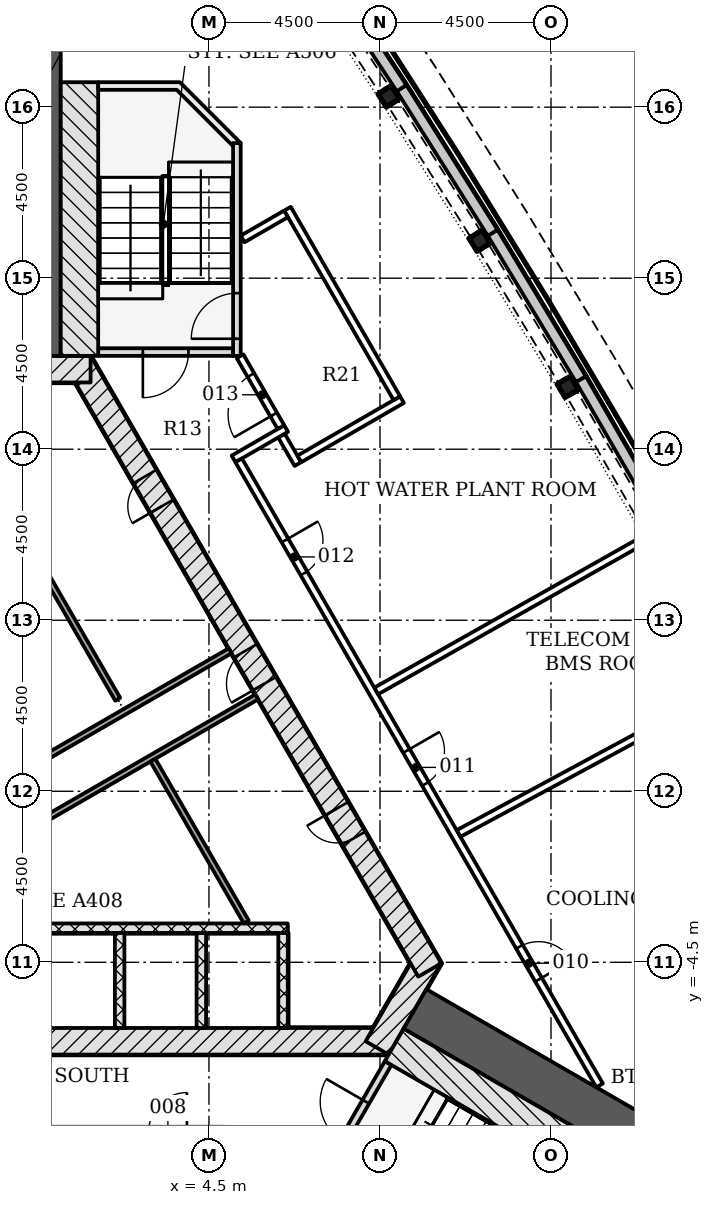
"""IFC4 building model, lengths in metres.
Left out: names, types, materials, properties, quantities, classifications, styles, units other than length and angle.
Written with IfcOpenShell. Run it as: python <this file> out.ifc"""

import sys

from ifc_helpers import new_model, si_unit, direction, frame, frame_2d, origin, origin_2d, place, context, subcontext, project, spatial, polyline, rectangle, i_section, outline, extrude, element, fill, save


model = new_model("IFC4")
c1 = context("Model", 3, precision=1e-05, world=origin(), true_north=direction((0.0, 1.0)))
c2 = subcontext(c1, "Body", "Model", "MODEL_VIEW")
j1 = project(units=[si_unit("LENGTHUNIT", "METRE"), si_unit("PLANEANGLEUNIT", "RADIAN")], contexts=[c1])
p1 = place(None, origin())
s1 = spatial("IfcSite", under=j1, at=p1, CompositionType="ELEMENT")
p2 = place(p1, origin())
s2 = spatial("IfcBuilding", under=s1, at=p2, CompositionType="ELEMENT")
p3 = place(p2, frame((0.0, 0.0, 52.8)))
s3 = spatial("IfcBuildingStorey", under=s2, at=p3, CompositionType="ELEMENT", Elevation=52.8)
p4 = place(p3, frame((-9.229, -6.578, -0.3), z_axis=(0.0, 0.0, 1.0), x_axis=(1.0, 0.0, 0.0)))
e1 = element("IfcWall", 1, at=p4, inside=s3, PredefinedType="SHEAR", context=c2, shape_type="SweptSolid", body=[
    extrude(rectangle(XDim=18.458, YDim=0.7, at=frame_2d((9.229, 0.0))), origin(), (0.0, 0.0, 1.0), 5.5),
])
p5 = place(p4, frame((1.079, 0.0, 0.3)))
e2 = element("IfcOpeningElement", 2, at=p5, cuts=e1, PredefinedType="OPENING", context=c2, shape_type="SweptSolid", body=[
    extrude(rectangle(XDim=0.9, YDim=2.1, at=frame_2d((0.45, 1.05))), frame((0.0, 0.36, 0.0), z_axis=(0.0, -1.0, 0.0), x_axis=(1.0, 0.0, 0.0)), (0.0, 0.0, 1.0), 0.72),
])
p6 = place(p3, frame((8.926, -6.753, -0.3), z_axis=(0.0, 0.0, 1.0), x_axis=(0.500042739161, 0.866000726912, 0.0)))
e3 = element("IfcWall", 3, at=p6, inside=s3, PredefinedType="SHEAR", context=c2, shape_type="SweptSolid", body=[
    extrude(rectangle(XDim=2.771, YDim=0.7, at=frame_2d((1.386, 0.0))), origin(), (0.0, 0.0, 1.0), 5.5),
])
p7 = place(p3, frame((10.311, -4.703, -0.3), z_axis=(0.0, 0.0, 1.0), x_axis=(-0.500001446645, 0.866024568562, 0.0)))
e4 = element("IfcWall", 4, at=p7, inside=s3, PredefinedType="SHEAR", context=c2, shape_type="SweptSolid", body=[
    extrude(rectangle(XDim=18.458, YDim=0.7, at=frame_2d((9.229, 0.0))), origin(), (0.0, 0.0, 1.0), 5.5),
])
p8 = place(p7, frame((8.7, 0.0, 0.3)))
e5 = element("IfcOpeningElement", 5, at=p8, cuts=e4, PredefinedType="OPENING", context=c2, shape_type="SweptSolid", body=[
    extrude(rectangle(XDim=1.0, YDim=2.1, at=frame_2d((0.5, 1.05))), frame((0.0, 0.36, 0.0), z_axis=(0.0, -1.0, 0.0), x_axis=(1.0, 0.0, 0.0)), (0.0, 0.0, 1.0), 0.72),
])
p9 = place(p7, frame((4.002, 0.0, 0.3)))
e6 = element("IfcOpeningElement", 6, at=p9, cuts=e4, PredefinedType="OPENING", context=c2, shape_type="SweptSolid", body=[
    extrude(rectangle(XDim=0.9, YDim=2.1, at=frame_2d((0.45, 1.05))), frame((0.0, 0.36, 0.0), z_axis=(0.0, -1.0, 0.0), x_axis=(1.0, 0.0, 0.0)), (0.0, 0.0, 1.0), 0.72),
])
p10 = place(p7, frame((14.093, 0.0, 0.3)))
e7 = element("IfcOpeningElement", 7, at=p10, cuts=e4, PredefinedType="OPENING", context=c2, shape_type="SweptSolid", body=[
    extrude(rectangle(XDim=0.9, YDim=2.1, at=frame_2d((0.45, 1.05))), frame((0.0, 0.36, 0.0), z_axis=(0.0, -1.0, 0.0), x_axis=(1.0, 0.0, 0.0)), (0.0, 0.0, 1.0), 0.72),
])
p11 = place(p3, frame((1.386, 11.106, -0.3), z_axis=(0.0, 0.0, 1.0), x_axis=(-1.0, 0.0, 0.0)))
e8 = element("IfcWall", 8, at=p11, inside=s3, PredefinedType="SHEAR", context=c2, shape_type="SweptSolid", body=[
    extrude(rectangle(XDim=2.771, YDim=0.7, at=frame_2d((1.386, 0.0))), origin(), (0.0, 0.0, 1.0), 5.5),
])
p12 = place(p3, frame((0.0, 11.456, -0.3), z_axis=(0.0, 0.0, 1.0), x_axis=(0.0, 1.0, 0.0)))
e9 = element("IfcWall", 9, at=p12, inside=s3, PredefinedType="SHEAR", context=c2, shape_type="SweptSolid", body=[
    extrude(rectangle(XDim=13.699, YDim=1.2, at=frame_2d((6.849, 0.0))), origin(), (0.0, 0.0, 1.0), 5.5),
])
p13 = place(p3, frame((9.922, -5.728, -0.3), z_axis=(0.0, 0.0, 1.0), x_axis=(0.866030067197, -0.499991922645, 0.0)))
e10 = element("IfcWall", 10, at=p13, inside=s3, PredefinedType="SHEAR", context=c2, shape_type="SweptSolid", body=[
    extrude(rectangle(XDim=13.698, YDim=1.2, at=frame_2d((6.849, 0.0))), origin(), (0.0, 0.0, 1.0), 5.5),
])
for number, where, z_axis, x_axis in (
    (11, (13.941, 10.641, -0.3), (0.0, 0.0, 1.0), (-0.508, 0.861, 0.0)),
    (12, (11.623, 14.485, -0.3), (0.0, 0.0, 1.0), (-0.525, 0.851, 0.0)),
    (13, (9.231, 18.285, -0.3), (0.0, 0.0, 1.0), (-0.541, 0.841, 0.0)),
):
    element("IfcColumn", number, at=place(p3, frame(where, z_axis=z_axis, x_axis=x_axis)), inside=s3, PredefinedType="COLUMN", context=c2, shape_type="SweptSolid", body=[
        extrude(i_section(OverallWidth=0.404, OverallDepth=0.406, WebThickness=0.027, FlangeThickness=0.044, FilletRadius=0.015, at=origin_2d()), origin(), (0.0, 0.0, 1.0), 5.5),
    ])
p14 = place(p3, origin())
e14 = element("IfcWall", 14, at=p14, inside=s3, PredefinedType="NOTDEFINED", context=c2, shape_type="SweptSolid", body=[
    extrude(outline(polyline([(16.665, 7.023), (14.415, 10.921), (14.155, 10.771), (16.405, 6.874), (16.665, 7.023)])), origin(), (0.0, 0.0, 1.0), 1.2),
])
p15 = place(p3, origin())
e15 = element("IfcWall", 15, at=p15, inside=s3, PredefinedType="NOTDEFINED", context=c2, shape_type="SweptSolid", body=[
    extrude(outline(polyline([(14.415, 10.921), (12.091, 14.774), (11.834, 14.619), (14.158, 10.766), (14.415, 10.921)])), origin(), (0.0, 0.0, 1.0), 1.2),
])
p16 = place(p3, origin())
e16 = element("IfcWall", 16, at=p16, inside=s3, PredefinedType="NOTDEFINED", context=c2, shape_type="SweptSolid", body=[
    extrude(outline(polyline([(12.091, 14.774), (9.694, 18.582), (9.44, 18.422), (11.837, 14.614), (12.091, 14.774)])), origin(), (0.0, 0.0, 1.0), 1.2),
])
p17 = place(p3, origin())
e17 = element("IfcWall", 17, at=p17, inside=s3, PredefinedType="NOTDEFINED", context=c2, shape_type="SweptSolid", body=[
    extrude(outline(polyline([(9.694, 18.582), (7.225, 22.344), (6.974, 22.179), (9.443, 18.418), (9.694, 18.582)])), origin(), (0.0, 0.0, 1.0), 1.2),
])
for number, where, z_axis, x_axis in (
    (18, (2.15, -6.228, -0.3), (0.0, 0.0, 1.0), (0.0, 1.0, 0.0)),
    (19, (4.3, -6.228, -0.3), (0.0, 0.0, 1.0), (0.0, 1.0, 0.0)),
    (20, (6.45, -6.228, -0.3), (0.0, 0.0, 1.0), (0.0, 1.0, 0.0)),
):
    element("IfcWall", number, at=place(p3, frame(where, z_axis=z_axis, x_axis=x_axis)), inside=s3, PredefinedType="PARTITIONING", context=c2, shape_type="SweptSolid", body=[
        extrude(rectangle(XDim=2.5, YDim=0.25, at=frame_2d((1.25, 0.0))), origin(), (0.0, 0.0, 1.0), 5.5),
    ])
p18 = place(p3, frame((-6.575, -3.603, 0.0), z_axis=(0.0, 0.0, 1.0), x_axis=(1.0, 0.0, 0.0)))
e21 = element("IfcWall", 21, at=p18, inside=s3, PredefinedType="PARTITIONING", context=c2, shape_type="SweptSolid", body=[
    extrude(rectangle(XDim=13.15, YDim=0.25, at=frame_2d((6.575, 0.0))), origin(), (0.0, 0.0, 1.0), 5.2),
])
p19 = place(p3, frame((-4.548, -1.851, 0.0), z_axis=(0.0, 0.0, 1.0), x_axis=(0.866023939251, 0.500002536638, 0.0)))
e22 = element("IfcWall", 22, at=p19, inside=s3, PredefinedType="PARTITIONING", context=c2, shape_type="SweptSolid", body=[
    extrude(rectangle(XDim=11.092, YDim=0.15, at=frame_2d((5.546, 0.0))), origin(), (0.0, 0.0, 1.0), 5.2),
])
p20 = place(p19, frame((3.497, 0.0, 0.0)))
e23 = element("IfcOpeningElement", 23, at=p20, cuts=e22, PredefinedType="OPENING", context=c2, shape_type="SweptSolid", body=[
    extrude(rectangle(XDim=0.9, YDim=2.1, at=frame_2d((0.45, 1.05))), frame((0.0, 0.085, 0.0), z_axis=(0.0, -1.0, 0.0), x_axis=(1.0, 0.0, 0.0)), (0.0, 0.0, 1.0), 0.17),
])
p21 = place(p3, frame((2.099, 2.42, 0.0), z_axis=(0.0, 0.0, 1.0), x_axis=(-0.499998449073, 0.866026299211, 0.0)))
e24 = element("IfcWall", 24, at=p21, inside=s3, PredefinedType="PARTITIONING", context=c2, shape_type="SweptSolid", body=[
    extrude(rectangle(XDim=4.211, YDim=0.15, at=frame_2d((2.106, 0.0))), origin(), (0.0, 0.0, 1.0), 5.2),
])
p22 = place(p3, frame((-4.454, -3.413, 0.0), z_axis=(0.0, 0.0, 1.0), x_axis=(0.86603043987, 0.499991277142, 0.0)))
e25 = element("IfcWall", 25, at=p22, inside=s3, PredefinedType="PARTITIONING", context=c2, shape_type="SweptSolid", body=[
    extrude(rectangle(XDim=11.792, YDim=0.15, at=frame_2d((5.896, 0.0))), origin(), (0.0, 0.0, 1.0), 5.2),
])
p23 = place(p22, frame((3.847, 0.0, 0.0)))
e26 = element("IfcOpeningElement", 26, at=p23, cuts=e25, PredefinedType="OPENING", context=c2, shape_type="SweptSolid", body=[
    extrude(rectangle(XDim=0.9, YDim=2.1, at=frame_2d((0.45, 1.05))), frame((0.0, 0.085, 0.0), z_axis=(0.0, -1.0, 0.0), x_axis=(1.0, 0.0, 0.0)), (0.0, 0.0, 1.0), 0.17),
])
p24 = place(p3, frame((5.482, -3.439, 0.0), z_axis=(0.0, 0.0, 1.0), x_axis=(-0.500006183238, 0.866021833861, 0.0)))
e27 = element("IfcWall", 27, at=p24, inside=s3, PredefinedType="PARTITIONING", context=c2, shape_type="SweptSolid", body=[
    extrude(rectangle(XDim=4.916, YDim=0.15, at=frame_2d((2.458, 0.0))), origin(), (0.0, 0.0, 1.0), 5.2),
])
p25 = place(p3, frame((5.135, 11.556, -0.3), z_axis=(0.0, 0.0, 1.0), x_axis=(-1.0, 0.0, 0.0)))
e28 = element("IfcWall", 28, at=p25, inside=s3, PredefinedType="SHEAR", context=c2, shape_type="SweptSolid", body=[
    extrude(rectangle(XDim=3.55, YDim=0.2, at=frame_2d((1.775, 0.0))), origin(), (0.0, 0.0, 1.0), 5.5),
])
p26 = place(p25, frame((1.175, 0.0, 0.3)))
e29 = element("IfcOpeningElement", 29, at=p26, cuts=e28, PredefinedType="OPENING", context=c2, shape_type="SweptSolid", body=[
    extrude(rectangle(XDim=1.2, YDim=2.1, at=frame_2d((0.6, 1.05))), frame((0.0, 0.11, 0.0), z_axis=(0.0, -1.0, 0.0), x_axis=(1.0, 0.0, 0.0)), (0.0, 0.0, 1.0), 0.22),
])
p27 = place(p3, frame((5.236, 11.456, -0.3), z_axis=(0.0, 0.0, 1.0), x_axis=(0.0, 1.0, 0.0)))
e30 = element("IfcWall", 30, at=p27, inside=s3, PredefinedType="SHEAR", context=c2, shape_type="SweptSolid", body=[
    extrude(rectangle(XDim=5.6, YDim=0.2, at=frame_2d((2.8, 0.0))), origin(), (0.0, 0.0, 1.0), 5.5),
])
p28 = place(p27, frame((0.45, 0.0, 0.3)))
e31 = element("IfcOpeningElement", 31, at=p28, cuts=e30, PredefinedType="OPENING", context=c2, shape_type="SweptSolid", body=[
    extrude(rectangle(XDim=1.2, YDim=2.1, at=frame_2d((0.6, 1.05))), frame((0.0, 0.11, 0.0), z_axis=(0.0, -1.0, 0.0), x_axis=(1.0, 0.0, 0.0)), (0.0, 0.0, 1.0), 0.22),
])
p29 = place(p3, frame((1.093, 11.456, -0.3), z_axis=(0.0, 0.0, 1.0), x_axis=(0.0, 1.0, 0.0)))
e32 = element("IfcWall", 32, at=p29, inside=s3, PredefinedType="SHEAR", context=c2, shape_type="SweptSolid", body=[
    extrude(rectangle(XDim=7.2, YDim=0.986, at=frame_2d((3.6, 0.0))), origin(), (0.0, 0.0, 1.0), 5.5),
])
p30 = place(p3, frame((0.0, 0.0, -0.3)))
e33 = element("IfcWall", 33, at=p30, inside=s3, PredefinedType="SHEAR", context=c2, shape_type="SweptSolid", body=[
    extrude(outline(polyline([(5.336, 17.056), (3.736, 18.656), (1.586, 18.656), (1.586, 18.456), (3.653, 18.456), (5.135, 16.974), (5.135, 17.056), (5.135, 17.056), (5.135, 17.056), (5.135, 17.056), (5.135, 17.056), (5.135, 17.056), (5.135, 17.056), (5.135, 17.056), (5.135, 17.056), (5.135, 17.056), (5.135, 17.056), (5.135, 17.056), (5.135, 17.056), (5.135, 17.056), (5.135, 17.056), (5.135, 17.056), (5.135, 17.056), (5.336, 17.056)])), origin(), (0.0, 0.0, 1.0), 5.5),
])
p31 = place(p3, frame((7.44, -10.226, -0.3), z_axis=(0.0, 0.0, 1.0), x_axis=(0.500022077904, 0.866012656725, 0.0)))
e34 = element("IfcWall", 34, at=p31, inside=s3, PredefinedType="SHEAR", context=c2, shape_type="SweptSolid", body=[
    extrude(rectangle(XDim=3.55, YDim=0.2, at=frame_2d((1.775, 0.0))), origin(), (0.0, 0.0, 1.0), 5.5),
])
p32 = place(p31, frame((1.175, 0.0, 0.3)))
e35 = element("IfcOpeningElement", 35, at=p32, cuts=e34, PredefinedType="OPENING", context=c2, shape_type="SweptSolid", body=[
    extrude(rectangle(XDim=1.2, YDim=2.1, at=frame_2d((0.6, 1.05))), frame((0.0, 0.11, 0.0), z_axis=(0.0, -1.0, 0.0), x_axis=(1.0, 0.0, 0.0)), (0.0, 0.0, 1.0), 0.22),
])
p33 = place(p3, frame((9.375, -6.675, -0.3), z_axis=(0.0, 0.0, 1.0), x_axis=(0.866026919366, -0.499997374926, 0.0)))
e36 = element("IfcWall", 36, at=p33, inside=s3, PredefinedType="SHEAR", context=c2, shape_type="SweptSolid", body=[
    extrude(rectangle(XDim=7.2, YDim=0.986, at=frame_2d((3.6, 0.0))), origin(), (0.0, 0.0, 1.0), 5.5),
])
p34 = place(p3, frame((6.408, 9.358, 0.0), z_axis=(0.0, 0.0, 1.0), x_axis=(0.49996696679, -0.866044474677, 0.0)))
e37 = element("IfcWall", 37, at=p34, inside=s3, PredefinedType="PARTITIONING", context=c2, shape_type="SweptSolid", body=[
    extrude(rectangle(XDim=0.864, YDim=0.2, at=frame_2d((0.432, 0.0))), origin(), (0.0, 0.0, 1.0), 5.2),
])
p35 = place(p3, frame((5.147, 8.745, 0.0), z_axis=(0.0, 0.0, 1.0), x_axis=(0.865987117328, 0.500066308224, 0.0)))
e38 = element("IfcWall", 38, at=p35, inside=s3, PredefinedType="PARTITIONING", context=c2, shape_type="SweptSolid", body=[
    extrude(rectangle(XDim=1.598, YDim=0.2, at=frame_2d((0.799, 0.0))), origin(), (0.0, 0.0, 1.0), 5.2),
])
p36 = place(p3, frame((6.395, 9.581, 0.0), z_axis=(0.0, 0.0, 1.0), x_axis=(-0.500003735859, 0.866023246874, 0.0)))
e39 = element("IfcWall", 39, at=p36, inside=s3, PredefinedType="PARTITIONING", context=c2, shape_type="SweptSolid", body=[
    extrude(rectangle(XDim=2.154, YDim=0.2, at=frame_2d((1.077, 0.0))), origin(), (0.0, 0.0, 1.0), 4.578),
])
p37 = place(p36, frame((0.383, 0.0, 0.0)))
e40 = element("IfcOpeningElement", 40, at=p37, cuts=e39, PredefinedType="OPENING", context=c2, shape_type="SweptSolid", body=[
    extrude(rectangle(XDim=1.2, YDim=2.1, at=frame_2d((0.6, 1.05))), frame((0.0, 0.11, 0.0), z_axis=(0.0, -1.0, 0.0), x_axis=(1.0, 0.0, 0.0)), (0.0, 0.0, 1.0), 0.22),
])
p38 = place(p3, frame((5.282, 8.708, 0.0), z_axis=(0.0, 0.0, 1.0), x_axis=(0.500007704848, -0.866020955343, 0.0)))
e41 = element("IfcWall", 41, at=p38, inside=s3, PredefinedType="PARTITIONING", context=c2, shape_type="SweptSolid", body=[
    extrude(rectangle(XDim=18.991, YDim=0.2, at=frame_2d((9.496, 0.0))), origin(), (0.0, 0.0, 1.0), 4.578),
])
p39 = place(p38, frame((14.779, 0.0, 0.0)))
e42 = element("IfcOpeningElement", 42, at=p39, cuts=e41, PredefinedType="OPENING", context=c2, shape_type="SweptSolid", body=[
    extrude(rectangle(XDim=1.0, YDim=2.1, at=frame_2d((0.5, 1.05))), frame((0.0, 0.11, 0.0), z_axis=(0.0, -1.0, 0.0), x_axis=(1.0, 0.0, 0.0)), (0.0, 0.0, 1.0), 0.22),
])
p40 = place(p38, frame((8.83, 0.0, 0.0)))
e43 = element("IfcOpeningElement", 43, at=p40, cuts=e41, PredefinedType="OPENING", context=c2, shape_type="SweptSolid", body=[
    extrude(rectangle(XDim=1.0, YDim=2.1, at=frame_2d((0.5, 1.05))), frame((0.0, 0.11, 0.0), z_axis=(0.0, -1.0, 0.0), x_axis=(1.0, 0.0, 0.0)), (0.0, 0.0, 1.0), 0.22),
])
p41 = place(p38, frame((2.435, 0.0, 0.0)))
e44 = element("IfcOpeningElement", 44, at=p41, cuts=e41, PredefinedType="OPENING", context=c2, shape_type="SweptSolid", body=[
    extrude(rectangle(XDim=1.0, YDim=2.1, at=frame_2d((0.5, 1.05))), frame((0.0, 0.11, 0.0), z_axis=(0.0, -1.0, 0.0), x_axis=(1.0, 0.0, 0.0)), (0.0, 0.0, 1.0), 0.22),
])
p42 = place(p3, frame((11.069, -1.11, 0.0), z_axis=(0.0, 0.0, 1.0), x_axis=(0.879990497743, 0.474991288218, 0.0)))
e45 = element("IfcWall", 45, at=p42, inside=s3, PredefinedType="PARTITIONING", context=c2, shape_type="SweptSolid", body=[
    extrude(rectangle(XDim=8.131, YDim=0.2, at=frame_2d((4.065, 0.0))), origin(), (0.0, 0.0, 1.0), 4.578),
])
p43 = place(p3, frame((8.902, 2.64, 0.0), z_axis=(0.0, 0.0, 1.0), x_axis=(0.87077197932, 0.491687054976, 0.0)))
e46 = element("IfcWall", 46, at=p43, inside=s3, PredefinedType="PARTITIONING", context=c2, shape_type="SweptSolid", body=[
    extrude(rectangle(XDim=8.215, YDim=0.2, at=frame_2d((4.107, 0.0))), origin(), (0.0, 0.0, 1.0), 4.578),
])
p44 = place(p3, frame((6.878, 8.744, 0.0), z_axis=(0.0, 0.0, 1.0), x_axis=(0.866023983177, 0.500002460556, 0.0)))
e47 = element("IfcWall", 47, at=p44, inside=s3, PredefinedType="PARTITIONING", context=c2, shape_type="SweptSolid", body=[
    extrude(rectangle(XDim=3.12, YDim=0.2, at=frame_2d((1.56, 0.0))), origin(), (0.0, 0.0, 1.0), 5.2),
])
p45 = place(p3, frame((6.566, 15.327, 0.0), z_axis=(0.0, 0.0, 1.0), x_axis=(0.499997778408, -0.866026686418, 0.0)))
e48 = element("IfcWall", 48, at=p45, inside=s3, PredefinedType="PARTITIONING", context=c2, shape_type="SweptSolid", body=[
    extrude(rectangle(XDim=5.757, YDim=0.2, at=frame_2d((2.878, 0.0))), origin(), (0.0, 0.0, 1.0), 4.578),
])
p46 = place(p3, frame((6.529, 15.192, 0.0), z_axis=(0.0, 0.0, 1.0), x_axis=(-0.866117824122, -0.499839889103, 0.0)))
e49 = element("IfcWall", 49, at=p46, inside=s3, PredefinedType="PARTITIONING", context=c2, shape_type="SweptSolid", body=[
    extrude(rectangle(XDim=1.32, YDim=0.2, at=frame_2d((0.66, 0.0))), origin(), (0.0, 0.0, 1.0), 5.2),
])
p47 = place(p8, origin())
e50 = element("IfcDoor", 50, at=p47, inside=s3, OperationType="SINGLE_SWING_LEFT", PredefinedType="DOOR", context=c2, shape_type="SweptSolid", body=[
    extrude(rectangle(XDim=1.0, YDim=2.1, at=frame_2d((0.5, 1.05))), frame((0.0, 0.075, 0.0), z_axis=(0.0, -1.0, 0.0), x_axis=(1.0, 0.0, 0.0)), (0.0, 0.0, 1.0), 0.15),
])
fill(e5, e50)
p48 = place(p9, origin())
e51 = element("IfcDoor", 51, at=p48, inside=s3, OperationType="SINGLE_SWING_RIGHT", PredefinedType="DOOR", context=c2, shape_type="SweptSolid", body=[
    extrude(rectangle(XDim=0.9, YDim=2.1, at=frame_2d((0.45, 1.05))), frame((0.0, 0.075, 0.0), z_axis=(0.0, -1.0, 0.0), x_axis=(1.0, 0.0, 0.0)), (0.0, 0.0, 1.0), 0.15),
])
fill(e6, e51)
p49 = place(p10, origin())
e52 = element("IfcDoor", 52, at=p49, inside=s3, OperationType="SINGLE_SWING_LEFT", PredefinedType="DOOR", context=c2, shape_type="SweptSolid", body=[
    extrude(rectangle(XDim=0.9, YDim=2.1, at=frame_2d((0.45, 1.05))), frame((0.0, 0.075, 0.0), z_axis=(0.0, -1.0, 0.0), x_axis=(1.0, 0.0, 0.0)), (0.0, 0.0, 1.0), 0.15),
])
fill(e7, e52)
p50 = place(p26, origin())
e53 = element("IfcDoor", 53, at=p50, inside=s3, OperationType="SINGLE_SWING_RIGHT", PredefinedType="DOOR", context=c2, shape_type="SweptSolid", body=[
    extrude(rectangle(XDim=1.2, YDim=2.1, at=frame_2d((0.6, 1.05))), frame((0.0, 0.025, 0.0), z_axis=(0.0, -1.0, 0.0), x_axis=(1.0, 0.0, 0.0)), (0.0, 0.0, 1.0), 0.05),
])
fill(e29, e53)
p51 = place(p28, origin())
e54 = element("IfcDoor", 54, at=p51, inside=s3, OperationType="SINGLE_SWING_LEFT", PredefinedType="DOOR", context=c2, shape_type="SweptSolid", body=[
    extrude(rectangle(XDim=1.2, YDim=2.1, at=frame_2d((0.6, 1.05))), frame((0.0, 0.025, 0.0), z_axis=(0.0, -1.0, 0.0), x_axis=(1.0, 0.0, 0.0)), (0.0, 0.0, 1.0), 0.05),
])
fill(e31, e54)
p52 = place(p32, origin())
e55 = element("IfcDoor", 55, at=p52, inside=s3, OperationType="SINGLE_SWING_RIGHT", PredefinedType="DOOR", context=c2, shape_type="SweptSolid", body=[
    extrude(rectangle(XDim=1.2, YDim=2.1, at=frame_2d((0.6, 1.05))), frame((0.0, 0.025, 0.0), z_axis=(0.0, -1.0, 0.0), x_axis=(1.0, 0.0, 0.0)), (0.0, 0.0, 1.0), 0.05),
])
fill(e35, e55)
p53 = place(p39, origin())
e56 = element("IfcDoor", 56, at=p53, inside=s3, OperationType="SINGLE_SWING_RIGHT", PredefinedType="DOOR", context=c2, shape_type="SweptSolid", body=[
    extrude(rectangle(XDim=1.0, YDim=2.1, at=frame_2d((0.5, 1.05))), frame((0.0, 0.025, 0.0), z_axis=(0.0, -1.0, 0.0), x_axis=(1.0, 0.0, 0.0)), (0.0, 0.0, 1.0), 0.05),
])
fill(e42, e56)
p54 = place(p40, origin())
e57 = element("IfcDoor", 57, at=p54, inside=s3, OperationType="SINGLE_SWING_LEFT", PredefinedType="DOOR", context=c2, shape_type="SweptSolid", body=[
    extrude(rectangle(XDim=1.0, YDim=2.1, at=frame_2d((0.5, 1.05))), frame((0.0, 0.025, 0.0), z_axis=(0.0, -1.0, 0.0), x_axis=(1.0, 0.0, 0.0)), (0.0, 0.0, 1.0), 0.05),
])
fill(e43, e57)
p55 = place(p41, origin())
e58 = element("IfcDoor", 58, at=p55, inside=s3, OperationType="SINGLE_SWING_LEFT", PredefinedType="DOOR", context=c2, shape_type="SweptSolid", body=[
    extrude(rectangle(XDim=1.0, YDim=2.1, at=frame_2d((0.5, 1.05))), frame((0.0, 0.025, 0.0), z_axis=(0.0, -1.0, 0.0), x_axis=(1.0, 0.0, 0.0)), (0.0, 0.0, 1.0), 0.05),
])
fill(e44, e58)
p56 = place(p37, origin())
e59 = element("IfcDoor", 59, at=p56, inside=s3, OperationType="SINGLE_SWING_LEFT", PredefinedType="DOOR", context=c2, shape_type="SweptSolid", body=[
    extrude(rectangle(XDim=1.2, YDim=2.1, at=frame_2d((0.6, 1.05))), frame((0.0, 0.025, 0.0), z_axis=(0.0, -1.0, 0.0), x_axis=(1.0, 0.0, 0.0)), (0.0, 0.0, 1.0), 0.05),
])
fill(e40, e59)
save(model, sys.argv[1])
